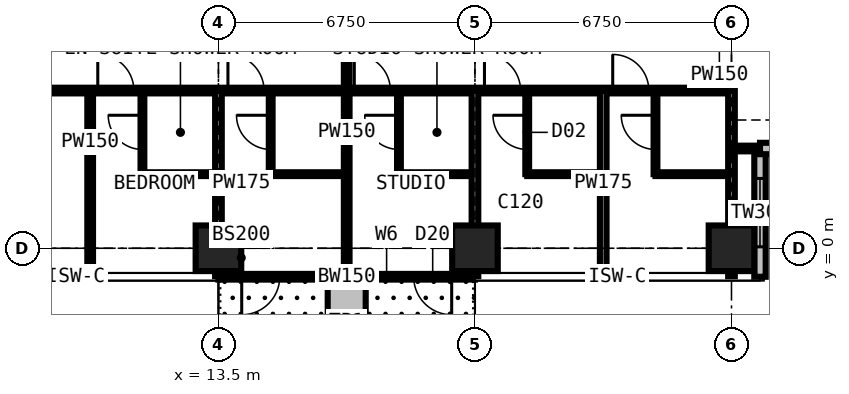
"""IFC4 building model, lengths in metres.
Left out: names, types, materials, properties, quantities, classifications, styles, units other than length and angle.
Written with IfcOpenShell. Run it as: python <this file> out.ifc"""

import sys

from ifc_helpers import new_model, si_unit, direction, frame, frame_2d, origin, origin_2d, place, context, subcontext, project, spatial, rectangle, extrude, element, fill, save


model = new_model("IFC4")
c1 = context("Model", 3, precision=1e-05, world=origin(), true_north=direction((0.0, 1.0)))
c2 = subcontext(c1, "Body", "Model", "MODEL_VIEW")
j1 = project(units=[si_unit("LENGTHUNIT", "METRE"), si_unit("PLANEANGLEUNIT", "RADIAN")], contexts=[c1])
p1 = place(None, origin())
s1 = spatial("IfcSite", under=j1, at=p1, CompositionType="ELEMENT")
p2 = place(p1, origin())
s2 = spatial("IfcBuilding", under=s1, at=p2, CompositionType="ELEMENT")
p3 = place(p2, frame((0.0, 0.0, 185.4)))
s3 = spatial("IfcBuildingStorey", under=s2, at=p3, CompositionType="ELEMENT", Elevation=185.4)
for number, where, z_axis, x_axis in (
    (1, (13.5, 0.0, 0.0), (0.0, 0.0, 1.0), (1.0, 0.0, 0.0)),
    (2, (20.25, 0.0, 0.0), (0.0, 0.0, 1.0), (1.0, 0.0, 0.0)),
    (3, (27.0, 0.0, 0.0), (0.0, 0.0, 1.0), (1.0, 0.0, 0.0)),
):
    element("IfcColumn", number, at=place(p3, frame(where, z_axis=z_axis, x_axis=x_axis)), inside=s3, PredefinedType="COLUMN", context=c2, shape_type="SweptSolid", body=[
        extrude(rectangle(XDim=1.2, YDim=1.2, at=origin_2d()), origin(), (0.0, 0.0, 1.0), 3.6),
    ])
p4 = place(p3, frame((20.25, -0.75, 0.0), z_axis=(0.0, 0.0, 1.0), x_axis=(-1.0, 0.0, 0.0)))
e4 = element("IfcWall", 4, at=p4, inside=s3, PredefinedType="SOLIDWALL", context=c2, shape_type="SweptSolid", body=[
    extrude(rectangle(XDim=6.75, YDim=0.15, at=frame_2d((3.375, 0.0))), origin(), (0.0, 0.0, 1.0), 3.375),
])
p5 = place(p4, frame((0.613, 0.0, 0.0)))
e5 = element("IfcOpeningElement", 5, at=p5, cuts=e4, PredefinedType="OPENING", context=c2, shape_type="SweptSolid", body=[
    extrude(rectangle(XDim=1.0, YDim=2.2, at=frame_2d((0.5, 1.1))), frame((0.0, 0.085, 0.0), z_axis=(0.0, -1.0, 0.0), x_axis=(1.0, 0.0, 0.0)), (0.0, 0.0, 1.0), 0.17),
])
p6 = place(p4, frame((1.725, 0.0, 0.9)))
e6 = element("IfcOpeningElement", 6, at=p6, cuts=e4, PredefinedType="OPENING", context=c2, shape_type="SweptSolid", body=[
    extrude(rectangle(XDim=1.2, YDim=1.8, at=frame_2d((0.6, 0.9))), frame((0.0, 0.085, 0.0), z_axis=(0.0, -1.0, 0.0), x_axis=(1.0, 0.0, 0.0)), (0.0, 0.0, 1.0), 0.17),
])
p7 = place(p4, frame((5.137, 0.0, 0.0)))
e7 = element("IfcOpeningElement", 7, at=p7, cuts=e4, PredefinedType="OPENING", context=c2, shape_type="SweptSolid", body=[
    extrude(rectangle(XDim=1.0, YDim=2.2, at=frame_2d((0.5, 1.1))), frame((0.0, 0.085, 0.0), z_axis=(0.0, -1.0, 0.0), x_axis=(1.0, 0.0, 0.0)), (0.0, 0.0, 1.0), 0.17),
])
p8 = place(p4, frame((3.825, 0.0, 0.9)))
e8 = element("IfcOpeningElement", 8, at=p8, cuts=e4, PredefinedType="OPENING", context=c2, shape_type="SweptSolid", body=[
    extrude(rectangle(XDim=1.2, YDim=1.8, at=frame_2d((0.6, 0.9))), frame((0.0, 0.085, 0.0), z_axis=(0.0, -1.0, 0.0), x_axis=(1.0, 0.0, 0.0)), (0.0, 0.0, 1.0), 0.17),
])
p9 = place(p3, frame((27.75, -0.75, 0.0), z_axis=(0.0, 0.0, 1.0), x_axis=(0.0, 1.0, 0.0)))
e9 = element("IfcWall", 9, at=p9, inside=s3, PredefinedType="SOLIDWALL", context=c2, shape_type="SweptSolid", body=[
    extrude(rectangle(XDim=3.375, YDim=0.3, at=frame_2d((1.688, 0.0))), origin(), (0.0, 0.0, 1.0), 3.375),
])
p10 = place(p9, frame((0.788, 0.0, 0.6)))
e10 = element("IfcOpeningElement", 10, at=p10, cuts=e9, PredefinedType="OPENING", context=c2, shape_type="SweptSolid", body=[
    extrude(rectangle(XDim=1.8, YDim=2.1, at=frame_2d((0.9, 1.05))), frame((0.0, 0.16, 0.0), z_axis=(0.0, -1.0, 0.0), x_axis=(1.0, 0.0, 0.0)), (0.0, 0.0, 1.0), 0.32),
])
p11 = place(p3, frame((27.75, 2.625, 0.0), z_axis=(0.0, 0.0, 1.0), x_axis=(1.0, 0.0, 0.0)))
e11 = element("IfcWall", 11, at=p11, inside=s3, PredefinedType="SOLIDWALL", context=c2, shape_type="SweptSolid", body=[
    extrude(rectangle(XDim=3.375, YDim=0.3, at=frame_2d((1.688, 0.0))), origin(), (0.0, 0.0, 1.0), 3.375),
])
p12 = place(p11, frame((0.788, 0.0, 0.6)))
e12 = element("IfcOpeningElement", 12, at=p12, cuts=e11, PredefinedType="OPENING", context=c2, shape_type="SweptSolid", body=[
    extrude(rectangle(XDim=1.8, YDim=2.1, at=frame_2d((0.9, 1.05))), frame((0.0, 0.16, 0.0), z_axis=(0.0, -1.0, 0.0), x_axis=(1.0, 0.0, 0.0)), (0.0, 0.0, 1.0), 0.32),
])
p13 = place(p3, frame((16.875, -0.85, 0.0), z_axis=(0.0, 0.0, 1.0), x_axis=(0.0, -1.0, 0.0)))
e13 = element("IfcWall", 13, at=p13, inside=s3, PredefinedType="USERDEFINED", context=c2, shape_type="SweptSolid", body=[
    extrude(rectangle(XDim=2.2, YDim=1.0, at=frame_2d((1.1, 0.0))), origin(), (0.0, 0.0, 1.0), 0.9),
])
p14 = place(p3, frame((6.75, 4.15, 0.0), z_axis=(0.0, 0.0, 1.0), x_axis=(1.0, 0.0, 0.0)))
e14 = element("IfcWall", 14, at=p14, inside=s3, PredefinedType="PARTITIONING", context=c2, shape_type="SweptSolid", body=[
    extrude(rectangle(XDim=20.25, YDim=0.15, at=frame_2d((10.125, 0.0))), origin(), (0.0, 0.0, 1.0), 3.375),
])
p15 = place(p14, frame((1.2, 0.0, 0.0)))
e15 = element("IfcOpeningElement", 15, at=p15, cuts=e14, PredefinedType="OPENING", context=c2, shape_type="SweptSolid", body=[
    extrude(rectangle(XDim=1.0, YDim=2.2, at=frame_2d((0.5, 1.1))), frame((0.0, 0.085, 0.0), z_axis=(0.0, -1.0, 0.0), x_axis=(1.0, 0.0, 0.0)), (0.0, 0.0, 1.0), 0.17),
])
p16 = place(p14, frame((3.575, 0.0, 0.0)))
e16 = element("IfcOpeningElement", 16, at=p16, cuts=e14, PredefinedType="OPENING", context=c2, shape_type="SweptSolid", body=[
    extrude(rectangle(XDim=0.95, YDim=2.2, at=frame_2d((0.475, 1.1))), frame((0.0, 0.085, 0.0), z_axis=(0.0, -1.0, 0.0), x_axis=(1.0, 0.0, 0.0)), (0.0, 0.0, 1.0), 0.17),
])
p17 = place(p14, frame((7.0, 0.0, 0.0)))
e17 = element("IfcOpeningElement", 17, at=p17, cuts=e14, PredefinedType="OPENING", context=c2, shape_type="SweptSolid", body=[
    extrude(rectangle(XDim=0.95, YDim=2.2, at=frame_2d((0.475, 1.1))), frame((0.0, 0.085, 0.0), z_axis=(0.0, -1.0, 0.0), x_axis=(1.0, 0.0, 0.0)), (0.0, 0.0, 1.0), 0.17),
])
p18 = place(p14, frame((10.325, 0.0, 0.0)))
e18 = element("IfcOpeningElement", 18, at=p18, cuts=e14, PredefinedType="OPENING", context=c2, shape_type="SweptSolid", body=[
    extrude(rectangle(XDim=0.95, YDim=2.2, at=frame_2d((0.475, 1.1))), frame((0.0, 0.085, 0.0), z_axis=(0.0, -1.0, 0.0), x_axis=(1.0, 0.0, 0.0)), (0.0, 0.0, 1.0), 0.17),
])
p19 = place(p14, frame((13.75, 0.0, 0.0)))
e19 = element("IfcOpeningElement", 19, at=p19, cuts=e14, PredefinedType="OPENING", context=c2, shape_type="SweptSolid", body=[
    extrude(rectangle(XDim=0.95, YDim=2.2, at=frame_2d((0.475, 1.1))), frame((0.0, 0.085, 0.0), z_axis=(0.0, -1.0, 0.0), x_axis=(1.0, 0.0, 0.0)), (0.0, 0.0, 1.0), 0.17),
])
p20 = place(p14, frame((17.125, 0.0, 0.0)))
e20 = element("IfcOpeningElement", 20, at=p20, cuts=e14, PredefinedType="OPENING", context=c2, shape_type="SweptSolid", body=[
    extrude(rectangle(XDim=0.95, YDim=2.2, at=frame_2d((0.475, 1.1))), frame((0.0, 0.085, 0.0), z_axis=(0.0, -1.0, 0.0), x_axis=(1.0, 0.0, 0.0)), (0.0, 0.0, 1.0), 0.17),
])
p21 = place(p3, frame((10.125, -0.734, 0.0), z_axis=(0.0, 0.0, 1.0), x_axis=(0.0, 1.0, 0.0)))
e21 = element("IfcWall", 21, at=p21, inside=s3, PredefinedType="PARTITIONING", context=c2, shape_type="SweptSolid", body=[
    extrude(rectangle(XDim=4.884, YDim=0.15, at=frame_2d((2.442, 0.0))), origin(), (0.0, 0.0, 1.0), 3.375),
])
p22 = place(p3, frame((11.5, 1.95, 0.0), z_axis=(0.0, 0.0, 1.0), x_axis=(0.0, 1.0, 0.0)))
e22 = element("IfcWall", 22, at=p22, inside=s3, PredefinedType="PARTITIONING", context=c2, shape_type="SweptSolid", body=[
    extrude(rectangle(XDim=2.2, YDim=0.1, at=frame_2d((1.1, 0.0))), origin(), (0.0, 0.0, 1.0), 3.375),
])
p23 = place(p22, frame((0.65, 0.0, 0.0)))
e23 = element("IfcOpeningElement", 23, at=p23, cuts=e22, PredefinedType="OPENING", context=c2, shape_type="SweptSolid", body=[
    extrude(rectangle(XDim=0.9, YDim=2.2, at=frame_2d((0.45, 1.1))), frame((0.0, 0.06, 0.0), z_axis=(0.0, -1.0, 0.0), x_axis=(1.0, 0.0, 0.0)), (0.0, 0.0, 1.0), 0.12),
])
p24 = place(p3, frame((11.5, 1.95, 0.0), z_axis=(0.0, 0.0, 1.0), x_axis=(1.0, 0.0, 0.0)))
e24 = element("IfcWall", 24, at=p24, inside=s3, PredefinedType="PARTITIONING", context=c2, shape_type="SweptSolid", body=[
    extrude(rectangle(XDim=2.0, YDim=0.1, at=frame_2d((1.0, 0.0))), origin(), (0.0, 0.0, 1.0), 3.375),
])
p25 = place(p3, frame((13.5, -0.734, 0.0), z_axis=(0.0, 0.0, 1.0), x_axis=(0.0, 1.0, 0.0)))
e25 = element("IfcWall", 25, at=p25, inside=s3, PredefinedType="PARTITIONING", context=c2, shape_type="SweptSolid", body=[
    extrude(rectangle(XDim=4.884, YDim=0.175, at=frame_2d((2.442, 0.0))), origin(), (0.0, 0.0, 1.0), 2.877),
])
p26 = place(p3, frame((14.875, 1.95, 0.0), z_axis=(0.0, 0.0, 1.0), x_axis=(0.0, 1.0, 0.0)))
e26 = element("IfcWall", 26, at=p26, inside=s3, PredefinedType="PARTITIONING", context=c2, shape_type="SweptSolid", body=[
    extrude(rectangle(XDim=2.2, YDim=0.1, at=frame_2d((1.1, 0.0))), origin(), (0.0, 0.0, 1.0), 3.375),
])
p27 = place(p26, frame((0.65, 0.0, 0.0)))
e27 = element("IfcOpeningElement", 27, at=p27, cuts=e26, PredefinedType="OPENING", context=c2, shape_type="SweptSolid", body=[
    extrude(rectangle(XDim=0.9, YDim=2.2, at=frame_2d((0.45, 1.1))), frame((0.0, 0.06, 0.0), z_axis=(0.0, -1.0, 0.0), x_axis=(1.0, 0.0, 0.0)), (0.0, 0.0, 1.0), 0.12),
])
p28 = place(p3, frame((14.875, 1.95, 0.0), z_axis=(0.0, 0.0, 1.0), x_axis=(1.0, 0.0, 0.0)))
e28 = element("IfcWall", 28, at=p28, inside=s3, PredefinedType="PARTITIONING", context=c2, shape_type="SweptSolid", body=[
    extrude(rectangle(XDim=2.0, YDim=0.1, at=frame_2d((1.0, 0.0))), origin(), (0.0, 0.0, 1.0), 3.375),
])
p29 = place(p3, frame((16.875, -0.734, 0.0), z_axis=(0.0, 0.0, 1.0), x_axis=(0.0, 1.0, 0.0)))
e29 = element("IfcWall", 29, at=p29, inside=s3, PredefinedType="PARTITIONING", context=c2, shape_type="SweptSolid", body=[
    extrude(rectangle(XDim=12.034, YDim=0.15, at=frame_2d((6.017, 0.0))), origin(), (0.0, 0.0, 1.0), 3.375),
])
p30 = place(p3, frame((18.25, 1.95, 0.0), z_axis=(0.0, 0.0, 1.0), x_axis=(0.0, 1.0, 0.0)))
e30 = element("IfcWall", 30, at=p30, inside=s3, PredefinedType="PARTITIONING", context=c2, shape_type="SweptSolid", body=[
    extrude(rectangle(XDim=2.2, YDim=0.1, at=frame_2d((1.1, 0.0))), origin(), (0.0, 0.0, 1.0), 3.375),
])
p31 = place(p30, frame((0.65, 0.0, 0.0)))
e31 = element("IfcOpeningElement", 31, at=p31, cuts=e30, PredefinedType="OPENING", context=c2, shape_type="SweptSolid", body=[
    extrude(rectangle(XDim=0.9, YDim=2.2, at=frame_2d((0.45, 1.1))), frame((0.0, 0.06, 0.0), z_axis=(0.0, -1.0, 0.0), x_axis=(1.0, 0.0, 0.0)), (0.0, 0.0, 1.0), 0.12),
])
p32 = place(p3, frame((18.25, 1.95, 0.0), z_axis=(0.0, 0.0, 1.0), x_axis=(1.0, 0.0, 0.0)))
e32 = element("IfcWall", 32, at=p32, inside=s3, PredefinedType="PARTITIONING", context=c2, shape_type="SweptSolid", body=[
    extrude(rectangle(XDim=2.0, YDim=0.1, at=frame_2d((1.0, 0.0))), origin(), (0.0, 0.0, 1.0), 3.375),
])
p33 = place(p3, frame((20.25, -0.734, 0.0), z_axis=(0.0, 0.0, 1.0), x_axis=(0.0, 1.0, 0.0)))
e33 = element("IfcWall", 33, at=p33, inside=s3, PredefinedType="PARTITIONING", context=c2, shape_type="SweptSolid", body=[
    extrude(rectangle(XDim=4.884, YDim=0.175, at=frame_2d((2.442, 0.0))), origin(), (0.0, 0.0, 1.0), 2.877),
])
p34 = place(p3, frame((21.625, 1.95, 0.0), z_axis=(0.0, 0.0, 1.0), x_axis=(0.0, 1.0, 0.0)))
e34 = element("IfcWall", 34, at=p34, inside=s3, PredefinedType="PARTITIONING", context=c2, shape_type="SweptSolid", body=[
    extrude(rectangle(XDim=2.2, YDim=0.1, at=frame_2d((1.1, 0.0))), origin(), (0.0, 0.0, 1.0), 3.375),
])
p35 = place(p34, frame((0.65, 0.0, 0.0)))
e35 = element("IfcOpeningElement", 35, at=p35, cuts=e34, PredefinedType="OPENING", context=c2, shape_type="SweptSolid", body=[
    extrude(rectangle(XDim=0.9, YDim=2.2, at=frame_2d((0.45, 1.1))), frame((0.0, 0.06, 0.0), z_axis=(0.0, -1.0, 0.0), x_axis=(1.0, 0.0, 0.0)), (0.0, 0.0, 1.0), 0.12),
])
p36 = place(p3, frame((21.625, 1.95, 0.0), z_axis=(0.0, 0.0, 1.0), x_axis=(1.0, 0.0, 0.0)))
e36 = element("IfcWall", 36, at=p36, inside=s3, PredefinedType="PARTITIONING", context=c2, shape_type="SweptSolid", body=[
    extrude(rectangle(XDim=2.0, YDim=0.1, at=frame_2d((1.0, 0.0))), origin(), (0.0, 0.0, 1.0), 3.375),
])
p37 = place(p3, frame((23.625, -0.734, 0.0), z_axis=(0.0, 0.0, 1.0), x_axis=(0.0, 1.0, 0.0)))
e37 = element("IfcWall", 37, at=p37, inside=s3, PredefinedType="PARTITIONING", context=c2, shape_type="SweptSolid", body=[
    extrude(rectangle(XDim=4.884, YDim=0.175, at=frame_2d((2.442, 0.0))), origin(), (0.0, 0.0, 1.0), 3.375),
])
p38 = place(p3, frame((25.0, 1.95, 0.0), z_axis=(0.0, 0.0, 1.0), x_axis=(0.0, 1.0, 0.0)))
e38 = element("IfcWall", 38, at=p38, inside=s3, PredefinedType="PARTITIONING", context=c2, shape_type="SweptSolid", body=[
    extrude(rectangle(XDim=2.2, YDim=0.1, at=frame_2d((1.1, 0.0))), origin(), (0.0, 0.0, 1.0), 3.375),
])
p39 = place(p38, frame((0.65, 0.0, 0.0)))
e39 = element("IfcOpeningElement", 39, at=p39, cuts=e38, PredefinedType="OPENING", context=c2, shape_type="SweptSolid", body=[
    extrude(rectangle(XDim=0.9, YDim=2.2, at=frame_2d((0.45, 1.1))), frame((0.0, 0.06, 0.0), z_axis=(0.0, -1.0, 0.0), x_axis=(1.0, 0.0, 0.0)), (0.0, 0.0, 1.0), 0.12),
])
p40 = place(p3, frame((25.0, 1.95, 0.0), z_axis=(0.0, 0.0, 1.0), x_axis=(1.0, 0.0, 0.0)))
e40 = element("IfcWall", 40, at=p40, inside=s3, PredefinedType="PARTITIONING", context=c2, shape_type="SweptSolid", body=[
    extrude(rectangle(XDim=2.0, YDim=0.1, at=frame_2d((1.0, 0.0))), origin(), (0.0, 0.0, 1.0), 3.375),
])
p41 = place(p3, frame((27.0, -0.734, 0.0), z_axis=(0.0, 0.0, 1.0), x_axis=(0.0, 1.0, 0.0)))
e41 = element("IfcWall", 41, at=p41, inside=s3, PredefinedType="PARTITIONING", context=c2, shape_type="SweptSolid", body=[
    extrude(rectangle(XDim=4.884, YDim=0.175, at=frame_2d((2.442, 0.0))), origin(), (0.0, 0.0, 1.0), 2.877),
])
p42 = place(p3, frame((27.0, 2.625, 0.0), z_axis=(0.0, 0.0, 1.0), x_axis=(1.0, 0.0, 0.0)))
e42 = element("IfcWall", 42, at=p42, inside=s3, PredefinedType="PARTITIONING", context=c2, shape_type="SweptSolid", body=[
    extrude(rectangle(XDim=0.734, YDim=0.15, at=frame_2d((0.367, 0.0))), origin(), (0.0, 0.0, 1.0), 3.375),
])
p43 = place(p5, origin())
e43 = element("IfcDoor", 43, at=p43, inside=s3, OperationType="SINGLE_SWING_LEFT", PredefinedType="DOOR", context=c2, shape_type="SweptSolid", body=[
    extrude(rectangle(XDim=1.0, YDim=2.2, at=frame_2d((0.5, 1.1))), frame((0.0, 0.025, 0.0), z_axis=(0.0, -1.0, 0.0), x_axis=(1.0, 0.0, 0.0)), (0.0, 0.0, 1.0), 0.05),
])
fill(e5, e43)
p44 = place(p6, origin())
e44 = element("IfcWindow", 44, at=p44, inside=s3, PartitioningType="SINGLE_PANEL", PredefinedType="WINDOW", context=c2, shape_type="SweptSolid", body=[
    extrude(rectangle(XDim=1.2, YDim=1.8, at=frame_2d((0.6, 0.9))), frame((0.0, 0.03, 0.0), z_axis=(0.0, -1.0, 0.0), x_axis=(1.0, 0.0, 0.0)), (0.0, 0.0, 1.0), 0.06),
])
fill(e6, e44)
p45 = place(p7, origin())
e45 = element("IfcDoor", 45, at=p45, inside=s3, OperationType="SINGLE_SWING_RIGHT", PredefinedType="DOOR", context=c2, shape_type="SweptSolid", body=[
    extrude(rectangle(XDim=1.0, YDim=2.2, at=frame_2d((0.5, 1.1))), frame((0.0, 0.025, 0.0), z_axis=(0.0, -1.0, 0.0), x_axis=(1.0, 0.0, 0.0)), (0.0, 0.0, 1.0), 0.05),
])
fill(e7, e45)
p46 = place(p8, origin())
e46 = element("IfcWindow", 46, at=p46, inside=s3, PartitioningType="SINGLE_PANEL", PredefinedType="WINDOW", context=c2, shape_type="SweptSolid", body=[
    extrude(rectangle(XDim=1.2, YDim=1.8, at=frame_2d((0.6, 0.9))), frame((0.0, 0.03, 0.0), z_axis=(0.0, -1.0, 0.0), x_axis=(1.0, 0.0, 0.0)), (0.0, 0.0, 1.0), 0.06),
])
fill(e8, e46)
p47 = place(p10, origin())
e47 = element("IfcWindow", 47, at=p47, inside=s3, PartitioningType="SINGLE_PANEL", PredefinedType="WINDOW", context=c2, shape_type="SweptSolid", body=[
    extrude(rectangle(XDim=1.8, YDim=2.1, at=frame_2d((0.9, 1.05))), frame((0.0, 0.03, 0.0), z_axis=(0.0, -1.0, 0.0), x_axis=(1.0, 0.0, 0.0)), (0.0, 0.0, 1.0), 0.06),
])
fill(e10, e47)
p48 = place(p16, origin())
e48 = element("IfcDoor", 48, at=p48, inside=s3, OperationType="SINGLE_SWING_LEFT", PredefinedType="DOOR", context=c2, shape_type="SweptSolid", body=[
    extrude(rectangle(XDim=0.95, YDim=2.2, at=frame_2d((0.475, 1.1))), frame((0.0, 0.025, 0.0), z_axis=(0.0, -1.0, 0.0), x_axis=(1.0, 0.0, 0.0)), (0.0, 0.0, 1.0), 0.05),
])
fill(e16, e48)
p49 = place(p23, origin())
e49 = element("IfcDoor", 49, at=p49, inside=s3, OperationType="SINGLE_SWING_RIGHT", PredefinedType="DOOR", context=c2, shape_type="SweptSolid", body=[
    extrude(rectangle(XDim=0.9, YDim=2.2, at=frame_2d((0.45, 1.1))), frame((0.0, 0.025, 0.0), z_axis=(0.0, -1.0, 0.0), x_axis=(1.0, 0.0, 0.0)), (0.0, 0.0, 1.0), 0.05),
])
fill(e23, e49)
p50 = place(p17, origin())
e50 = element("IfcDoor", 50, at=p50, inside=s3, OperationType="SINGLE_SWING_LEFT", PredefinedType="DOOR", context=c2, shape_type="SweptSolid", body=[
    extrude(rectangle(XDim=0.95, YDim=2.2, at=frame_2d((0.475, 1.1))), frame((0.0, 0.025, 0.0), z_axis=(0.0, -1.0, 0.0), x_axis=(1.0, 0.0, 0.0)), (0.0, 0.0, 1.0), 0.05),
])
fill(e17, e50)
p51 = place(p27, origin())
e51 = element("IfcDoor", 51, at=p51, inside=s3, OperationType="SINGLE_SWING_RIGHT", PredefinedType="DOOR", context=c2, shape_type="SweptSolid", body=[
    extrude(rectangle(XDim=0.9, YDim=2.2, at=frame_2d((0.45, 1.1))), frame((0.0, 0.025, 0.0), z_axis=(0.0, -1.0, 0.0), x_axis=(1.0, 0.0, 0.0)), (0.0, 0.0, 1.0), 0.05),
])
fill(e27, e51)
p52 = place(p18, origin())
e52 = element("IfcDoor", 52, at=p52, inside=s3, OperationType="SINGLE_SWING_LEFT", PredefinedType="DOOR", context=c2, shape_type="SweptSolid", body=[
    extrude(rectangle(XDim=0.95, YDim=2.2, at=frame_2d((0.475, 1.1))), frame((0.0, 0.025, 0.0), z_axis=(0.0, -1.0, 0.0), x_axis=(1.0, 0.0, 0.0)), (0.0, 0.0, 1.0), 0.05),
])
fill(e18, e52)
p53 = place(p31, origin())
e53 = element("IfcDoor", 53, at=p53, inside=s3, OperationType="SINGLE_SWING_RIGHT", PredefinedType="DOOR", context=c2, shape_type="SweptSolid", body=[
    extrude(rectangle(XDim=0.9, YDim=2.2, at=frame_2d((0.45, 1.1))), frame((0.0, 0.025, 0.0), z_axis=(0.0, -1.0, 0.0), x_axis=(1.0, 0.0, 0.0)), (0.0, 0.0, 1.0), 0.05),
])
fill(e31, e53)
p54 = place(p19, origin())
e54 = element("IfcDoor", 54, at=p54, inside=s3, OperationType="SINGLE_SWING_LEFT", PredefinedType="DOOR", context=c2, shape_type="SweptSolid", body=[
    extrude(rectangle(XDim=0.95, YDim=2.2, at=frame_2d((0.475, 1.1))), frame((0.0, 0.025, 0.0), z_axis=(0.0, -1.0, 0.0), x_axis=(1.0, 0.0, 0.0)), (0.0, 0.0, 1.0), 0.05),
])
fill(e19, e54)
p55 = place(p35, origin())
e55 = element("IfcDoor", 55, at=p55, inside=s3, OperationType="SINGLE_SWING_RIGHT", PredefinedType="DOOR", context=c2, shape_type="SweptSolid", body=[
    extrude(rectangle(XDim=0.9, YDim=2.2, at=frame_2d((0.45, 1.1))), frame((0.0, 0.025, 0.0), z_axis=(0.0, -1.0, 0.0), x_axis=(1.0, 0.0, 0.0)), (0.0, 0.0, 1.0), 0.05),
])
fill(e35, e55)
p56 = place(p20, origin())
e56 = element("IfcDoor", 56, at=p56, inside=s3, OperationType="SINGLE_SWING_LEFT", PredefinedType="DOOR", context=c2, shape_type="SweptSolid", body=[
    extrude(rectangle(XDim=0.95, YDim=2.2, at=frame_2d((0.475, 1.1))), frame((0.0, 0.025, 0.0), z_axis=(0.0, -1.0, 0.0), x_axis=(1.0, 0.0, 0.0)), (0.0, 0.0, 1.0), 0.05),
])
fill(e20, e56)
p57 = place(p39, origin())
e57 = element("IfcDoor", 57, at=p57, inside=s3, OperationType="SINGLE_SWING_RIGHT", PredefinedType="DOOR", context=c2, shape_type="SweptSolid", body=[
    extrude(rectangle(XDim=0.9, YDim=2.2, at=frame_2d((0.45, 1.1))), frame((0.0, 0.025, 0.0), z_axis=(0.0, -1.0, 0.0), x_axis=(1.0, 0.0, 0.0)), (0.0, 0.0, 1.0), 0.05),
])
fill(e39, e57)
save(model, sys.argv[1])
